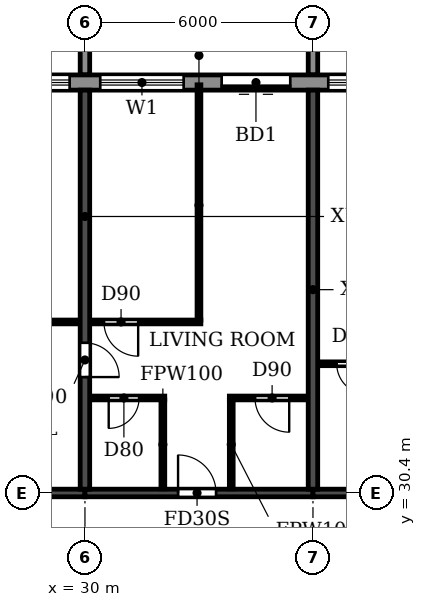
"""IFC4 building model, lengths in metres.
Left out: names, types, materials, properties, quantities, classifications, styles, units other than length and angle.
Written with IfcOpenShell. Run it as: python <this file> out.ifc"""

import sys

from ifc_helpers import new_model, si_unit, direction, frame, frame_2d, origin, place, context, subcontext, project, spatial, polyline, rectangle, outline, extrude, source, transform, mapped, element, fill, save


model = new_model("IFC4")
c1 = context("Model", 3, precision=1e-05, world=origin(), true_north=direction((0.0, 1.0)))
c2 = subcontext(c1, "Body", "Model", "MODEL_VIEW")
j1 = project(units=[si_unit("LENGTHUNIT", "METRE"), si_unit("PLANEANGLEUNIT", "RADIAN")], contexts=[c1])
p1 = place(None, origin())
s1 = spatial("IfcSite", under=j1, at=p1, CompositionType="ELEMENT")
p2 = place(p1, origin())
s2 = spatial("IfcBuilding", under=s1, at=p2, CompositionType="ELEMENT")
p3 = place(p2, frame((0.0, 0.0, 257.7)))
s3 = spatial("IfcBuildingStorey", under=s2, at=p3, CompositionType="ELEMENT", Elevation=257.7)
p4 = place(p3, frame((30.0, 30.5, 0.0), z_axis=(0.0, 0.0, 1.0), x_axis=(0.0, 1.0, 0.0)))
e1 = element("IfcWall", 1, at=p4, inside=s3, PredefinedType="SHEAR", context=c2, shape_type="SweptSolid", body=[
    extrude(rectangle(XDim=10.5, YDim=0.25, at=frame_2d((5.25, 0.0))), origin(), (0.0, 0.0, 1.0), 2.1),
])
p5 = place(p4, frame((2.95, 0.0, 0.0)))
e2 = element("IfcOpeningElement", 2, at=p5, cuts=e1, PredefinedType="OPENING", context=c2, shape_type="SweptSolid", body=[
    extrude(rectangle(XDim=0.9, YDim=2.1, at=frame_2d((0.45, 1.05))), frame((0.0, 0.135, 0.0), z_axis=(0.0, -1.0, 0.0), x_axis=(1.0, 0.0, 0.0)), (0.0, 0.0, 1.0), 0.27),
])
p6 = place(p3, frame((36.0, 30.5, 0.0), z_axis=(0.0, 0.0, 1.0), x_axis=(0.0, 1.0, 0.0)))
e3 = element("IfcWall", 3, at=p6, inside=s3, PredefinedType="SHEAR", context=c2, shape_type="SweptSolid", body=[
    extrude(rectangle(XDim=10.5, YDim=0.25, at=frame_2d((5.25, 0.0))), origin(), (0.0, 0.0, 1.0), 3.0),
])
p7 = place(p3, frame((24.0, 30.4, 0.0), z_axis=(0.0, 0.0, 1.0), x_axis=(1.0, 0.0, 0.0)))
e4 = element("IfcWall", 4, at=p7, inside=s3, PredefinedType="SHEAR", context=c2, shape_type="SweptSolid", body=[
    extrude(rectangle(XDim=6.0, YDim=0.2, at=frame_2d((3.0, 0.0))), origin(), (0.0, 0.0, 1.0), 2.4),
])
p8 = place(p3, frame((30.0, 30.4, 0.0), z_axis=(0.0, 0.0, 1.0), x_axis=(1.0, 0.0, 0.0)))
e5 = element("IfcWall", 5, at=p8, inside=s3, PredefinedType="SHEAR", context=c2, shape_type="SweptSolid", body=[
    extrude(rectangle(XDim=6.0, YDim=0.2, at=frame_2d((3.0, 0.0))), origin(), (0.0, 0.0, 1.0), 2.4),
])
p9 = place(p8, frame((2.45, 0.0, 0.0)))
e6 = element("IfcOpeningElement", 6, at=p9, cuts=e5, PredefinedType="OPENING", context=c2, shape_type="SweptSolid", body=[
    extrude(rectangle(XDim=1.0, YDim=2.1, at=frame_2d((0.5, 1.05))), frame((0.0, 0.11, 0.0), z_axis=(0.0, -1.0, 0.0), x_axis=(1.0, 0.0, 0.0)), (0.0, 0.0, 1.0), 0.22),
])
p10 = place(p3, frame((36.0, 30.4, 0.0), z_axis=(0.0, 0.0, 1.0), x_axis=(1.0, 0.0, 0.0)))
e7 = element("IfcWall", 7, at=p10, inside=s3, PredefinedType="SHEAR", context=c2, shape_type="SweptSolid", body=[
    extrude(rectangle(XDim=6.0, YDim=0.2, at=frame_2d((3.0, 0.0))), origin(), (0.0, 0.0, 1.0), 2.4),
])
p11 = place(p10, frame((2.45, 0.0, 0.0)))
e8 = element("IfcOpeningElement", 8, at=p11, cuts=e7, PredefinedType="OPENING", context=c2, shape_type="SweptSolid", body=[
    extrude(rectangle(XDim=1.0, YDim=2.1, at=frame_2d((0.5, 1.05))), frame((0.0, 0.11, 0.0), z_axis=(0.0, -1.0, 0.0), x_axis=(1.0, 0.0, 0.0)), (0.0, 0.0, 1.0), 0.22),
])
p12 = place(p3, frame((79.317, 41.2, 0.0), z_axis=(0.0, 0.0, 1.0), x_axis=(-1.0, 0.0, 0.0)))
e9 = element("IfcWall", 9, at=p12, inside=s3, PredefinedType="STANDARD", context=c2, shape_type="SweptSolid", body=[
    extrude(rectangle(XDim=56.634, YDim=0.4, at=frame_2d((28.317, 0.0))), origin(), (0.0, 0.0, 1.0), 3.0),
])
p13 = place(p12, frame((52.717, 0.0, 0.9)))
e10 = element("IfcOpeningElement", 10, at=p13, cuts=e9, PredefinedType="OPENING", context=c2, shape_type="SweptSolid", body=[
    extrude(rectangle(XDim=2.2, YDim=1.5, at=frame_2d((1.1, 0.75))), frame((0.0, 0.21, 0.0), z_axis=(0.0, -1.0, 0.0), x_axis=(1.0, 0.0, 0.0)), (0.0, 0.0, 1.0), 0.42),
])
p14 = place(p12, frame((49.717, 0.0, 0.9)))
e11 = element("IfcOpeningElement", 11, at=p14, cuts=e9, PredefinedType="OPENING", context=c2, shape_type="SweptSolid", body=[
    extrude(rectangle(XDim=2.2, YDim=1.5, at=frame_2d((1.1, 0.75))), frame((0.0, 0.21, 0.0), z_axis=(0.0, -1.0, 0.0), x_axis=(1.0, 0.0, 0.0)), (0.0, 0.0, 1.0), 0.42),
])
p15 = place(p12, frame((46.717, 0.0, 0.9)))
e12 = element("IfcOpeningElement", 12, at=p15, cuts=e9, PredefinedType="OPENING", context=c2, shape_type="SweptSolid", body=[
    extrude(rectangle(XDim=2.2, YDim=1.5, at=frame_2d((1.1, 0.75))), frame((0.0, 0.21, 0.0), z_axis=(0.0, -1.0, 0.0), x_axis=(1.0, 0.0, 0.0)), (0.0, 0.0, 1.0), 0.42),
])
p16 = place(p12, frame((43.917, 0.0, 0.0)))
e13 = element("IfcOpeningElement", 13, at=p16, cuts=e9, PredefinedType="OPENING", context=c2, shape_type="SweptSolid", body=[
    extrude(rectangle(XDim=1.8, YDim=2.4, at=frame_2d((0.9, 1.2))), frame((0.0, 0.21, 0.0), z_axis=(0.0, -1.0, 0.0), x_axis=(1.0, 0.0, 0.0)), (0.0, 0.0, 1.0), 0.42),
])
p17 = place(p12, frame((40.717, 0.0, 0.9)))
e14 = element("IfcOpeningElement", 14, at=p17, cuts=e9, PredefinedType="OPENING", context=c2, shape_type="SweptSolid", body=[
    extrude(rectangle(XDim=2.2, YDim=1.5, at=frame_2d((1.1, 0.75))), frame((0.0, 0.21, 0.0), z_axis=(0.0, -1.0, 0.0), x_axis=(1.0, 0.0, 0.0)), (0.0, 0.0, 1.0), 0.42),
])
p18 = place(p12, frame((37.917, 0.0, 0.0)))
e15 = element("IfcOpeningElement", 15, at=p18, cuts=e9, PredefinedType="OPENING", context=c2, shape_type="SweptSolid", body=[
    extrude(rectangle(XDim=1.8, YDim=2.4, at=frame_2d((0.9, 1.2))), frame((0.0, 0.21, 0.0), z_axis=(0.0, -1.0, 0.0), x_axis=(1.0, 0.0, 0.0)), (0.0, 0.0, 1.0), 0.42),
])
p19 = place(p12, frame((34.717, 0.0, 0.9)))
e16 = element("IfcOpeningElement", 16, at=p19, cuts=e9, PredefinedType="OPENING", context=c2, shape_type="SweptSolid", body=[
    extrude(rectangle(XDim=2.2, YDim=1.5, at=frame_2d((1.1, 0.75))), frame((0.0, 0.21, 0.0), z_axis=(0.0, -1.0, 0.0), x_axis=(1.0, 0.0, 0.0)), (0.0, 0.0, 1.0), 0.42),
])
p20 = place(p12, frame((31.717, 0.0, 0.9)))
e17 = element("IfcOpeningElement", 17, at=p20, cuts=e9, PredefinedType="OPENING", context=c2, shape_type="SweptSolid", body=[
    extrude(rectangle(XDim=2.2, YDim=1.5, at=frame_2d((1.1, 0.75))), frame((0.0, 0.21, 0.0), z_axis=(0.0, -1.0, 0.0), x_axis=(1.0, 0.0, 0.0)), (0.0, 0.0, 1.0), 0.42),
])
p21 = place(p12, frame((28.717, 0.0, 0.9)))
e18 = element("IfcOpeningElement", 18, at=p21, cuts=e9, PredefinedType="OPENING", context=c2, shape_type="SweptSolid", body=[
    extrude(rectangle(XDim=2.2, YDim=1.5, at=frame_2d((1.1, 0.75))), frame((0.0, 0.21, 0.0), z_axis=(0.0, -1.0, 0.0), x_axis=(1.0, 0.0, 0.0)), (0.0, 0.0, 1.0), 0.42),
])
p22 = place(p12, frame((25.917, 0.0, 0.0)))
e19 = element("IfcOpeningElement", 19, at=p22, cuts=e9, PredefinedType="OPENING", context=c2, shape_type="SweptSolid", body=[
    extrude(rectangle(XDim=1.8, YDim=2.4, at=frame_2d((0.9, 1.2))), frame((0.0, 0.21, 0.0), z_axis=(0.0, -1.0, 0.0), x_axis=(1.0, 0.0, 0.0)), (0.0, 0.0, 1.0), 0.42),
])
p23 = place(p12, frame((22.917, 0.0, 0.0)))
e20 = element("IfcOpeningElement", 20, at=p23, cuts=e9, PredefinedType="OPENING", context=c2, shape_type="SweptSolid", body=[
    extrude(rectangle(XDim=1.8, YDim=2.4, at=frame_2d((0.9, 1.2))), frame((0.0, 0.21, 0.0), z_axis=(0.0, -1.0, 0.0), x_axis=(1.0, 0.0, 0.0)), (0.0, 0.0, 1.0), 0.42),
])
p24 = place(p12, frame((19.717, 0.0, 0.9)))
e21 = element("IfcOpeningElement", 21, at=p24, cuts=e9, PredefinedType="OPENING", context=c2, shape_type="SweptSolid", body=[
    extrude(rectangle(XDim=2.2, YDim=1.5, at=frame_2d((1.1, 0.75))), frame((0.0, 0.21, 0.0), z_axis=(0.0, -1.0, 0.0), x_axis=(1.0, 0.0, 0.0)), (0.0, 0.0, 1.0), 0.42),
])
p25 = place(p12, frame((16.717, 0.0, 0.9)))
e22 = element("IfcOpeningElement", 22, at=p25, cuts=e9, PredefinedType="OPENING", context=c2, shape_type="SweptSolid", body=[
    extrude(rectangle(XDim=2.2, YDim=1.5, at=frame_2d((1.1, 0.75))), frame((0.0, 0.21, 0.0), z_axis=(0.0, -1.0, 0.0), x_axis=(1.0, 0.0, 0.0)), (0.0, 0.0, 1.0), 0.42),
])
p26 = place(p12, frame((13.717, 0.0, 0.9)))
e23 = element("IfcOpeningElement", 23, at=p26, cuts=e9, PredefinedType="OPENING", context=c2, shape_type="SweptSolid", body=[
    extrude(rectangle(XDim=2.2, YDim=1.5, at=frame_2d((1.1, 0.75))), frame((0.0, 0.21, 0.0), z_axis=(0.0, -1.0, 0.0), x_axis=(1.0, 0.0, 0.0)), (0.0, 0.0, 1.0), 0.42),
])
p27 = place(p12, frame((10.717, 0.0, 0.9)))
e24 = element("IfcOpeningElement", 24, at=p27, cuts=e9, PredefinedType="OPENING", context=c2, shape_type="SweptSolid", body=[
    extrude(rectangle(XDim=2.2, YDim=1.5, at=frame_2d((1.1, 0.75))), frame((0.0, 0.21, 0.0), z_axis=(0.0, -1.0, 0.0), x_axis=(1.0, 0.0, 0.0)), (0.0, 0.0, 1.0), 0.42),
])
p28 = place(p12, frame((7.917, 0.0, 0.0)))
e25 = element("IfcOpeningElement", 25, at=p28, cuts=e9, PredefinedType="OPENING", context=c2, shape_type="SweptSolid", body=[
    extrude(rectangle(XDim=1.8, YDim=2.4, at=frame_2d((0.9, 1.2))), frame((0.0, 0.21, 0.0), z_axis=(0.0, -1.0, 0.0), x_axis=(1.0, 0.0, 0.0)), (0.0, 0.0, 1.0), 0.42),
])
p29 = place(p12, frame((4.717, 0.0, 0.9)))
e26 = element("IfcOpeningElement", 26, at=p29, cuts=e9, PredefinedType="OPENING", context=c2, shape_type="SweptSolid", body=[
    extrude(rectangle(XDim=2.2, YDim=1.5, at=frame_2d((1.1, 0.75))), frame((0.0, 0.21, 0.0), z_axis=(0.0, -1.0, 0.0), x_axis=(1.0, 0.0, 0.0)), (0.0, 0.0, 1.0), 0.42),
])
p30 = place(p12, frame((1.917, 0.0, 0.0)))
e27 = element("IfcOpeningElement", 27, at=p30, cuts=e9, PredefinedType="OPENING", context=c2, shape_type="SweptSolid", body=[
    extrude(rectangle(XDim=1.8, YDim=2.4, at=frame_2d((0.9, 1.2))), frame((0.0, 0.21, 0.0), z_axis=(0.0, -1.0, 0.0), x_axis=(1.0, 0.0, 0.0)), (0.0, 0.0, 1.0), 0.42),
])
m1 = source(origin(), c2, "Body", "SweptSolid", [
    extrude(outline(polyline([(0.0, 0.0), (0.25, 0.0), (0.25, 3.1), (0.0, 3.1), (0.0, 0.0)])), origin(), (0.0, 0.0, 1.0), 2.1),
])
p31 = place(p3, frame((29.875, 41.4, 0.0)))
e28 = element("IfcWall", 28, at=p31, inside=s3, PredefinedType="STANDARD", context=c2, shape_type="MappedRepresentation", body=[
    mapped(m1, transform((0.0, 0.0, 0.0))),
])
m2 = source(origin(), c2, "Body", "SweptSolid", [
    extrude(outline(polyline([(0.0, 0.0), (0.25, 0.0), (0.25, 3.1), (0.0, 3.1), (0.0, 0.0)])), origin(), (0.0, 0.0, 1.0), 3.1),
])
p32 = place(p3, frame((35.875, 41.4, 0.0)))
e29 = element("IfcWall", 29, at=p32, inside=s3, PredefinedType="STANDARD", context=c2, shape_type="MappedRepresentation", body=[
    mapped(m2, transform((0.0, 0.0, 0.0))),
])
p33 = place(p3, frame((30.135, 32.9, 0.0), z_axis=(0.0, 0.0, 1.0), x_axis=(1.0, 0.0, 0.0)))
e30 = element("IfcWall", 30, at=p33, inside=s3, PredefinedType="PARTITIONING", context=c2, shape_type="SweptSolid", body=[
    extrude(rectangle(XDim=1.965, YDim=0.1, at=frame_2d((0.982, 0.0))), origin(), (0.0, 0.0, 1.0), 3.0),
])
p34 = place(p33, frame((0.49, 0.0, 0.0)))
e31 = element("IfcOpeningElement", 31, at=p34, cuts=e30, PredefinedType="OPENING", context=c2, shape_type="SweptSolid", body=[
    extrude(rectangle(XDim=0.8, YDim=2.1, at=frame_2d((0.4, 1.05))), frame((0.0, 0.06, 0.0), z_axis=(0.0, -1.0, 0.0), x_axis=(1.0, 0.0, 0.0)), (0.0, 0.0, 1.0), 0.12),
])
p35 = place(p3, frame((33.8, 32.9, 0.0), z_axis=(0.0, 0.0, 1.0), x_axis=(1.0, 0.0, 0.0)))
e32 = element("IfcWall", 32, at=p35, inside=s3, PredefinedType="PARTITIONING", context=c2, shape_type="SweptSolid", body=[
    extrude(rectangle(XDim=2.065, YDim=0.1, at=frame_2d((1.032, 0.0))), origin(), (0.0, 0.0, 1.0), 3.0),
])
p36 = place(p35, frame((0.675, 0.0, 0.0)))
e33 = element("IfcOpeningElement", 33, at=p36, cuts=e32, PredefinedType="OPENING", context=c2, shape_type="SweptSolid", body=[
    extrude(rectangle(XDim=0.9, YDim=2.1, at=frame_2d((0.45, 1.05))), frame((0.0, 0.06, 0.0), z_axis=(0.0, -1.0, 0.0), x_axis=(1.0, 0.0, 0.0)), (0.0, 0.0, 1.0), 0.12),
])
p37 = place(p3, frame((36.135, 33.8, 0.0), z_axis=(0.0, 0.0, 1.0), x_axis=(1.0, 0.0, 0.0)))
e34 = element("IfcWall", 34, at=p37, inside=s3, PredefinedType="PARTITIONING", context=c2, shape_type="SweptSolid", body=[
    extrude(rectangle(XDim=1.965, YDim=0.1, at=frame_2d((0.982, 0.0))), origin(), (0.0, 0.0, 1.0), 3.0),
])
p38 = place(p37, frame((0.49, 0.0, 0.0)))
e35 = element("IfcOpeningElement", 35, at=p38, cuts=e34, PredefinedType="OPENING", context=c2, shape_type="SweptSolid", body=[
    extrude(rectangle(XDim=0.8, YDim=2.1, at=frame_2d((0.4, 1.05))), frame((0.0, 0.06, 0.0), z_axis=(0.0, -1.0, 0.0), x_axis=(1.0, 0.0, 0.0)), (0.0, 0.0, 1.0), 0.12),
])
p39 = place(p3, frame((24.135, 34.9, 0.0), z_axis=(0.0, 0.0, 1.0), x_axis=(1.0, 0.0, 0.0)))
e36 = element("IfcWall", 36, at=p39, inside=s3, PredefinedType="PARTITIONING", context=c2, shape_type="SweptSolid", body=[
    extrude(rectangle(XDim=5.73, YDim=0.1, at=frame_2d((2.865, 0.0))), origin(), (0.0, 0.0, 1.0), 3.0),
])
p40 = place(p39, frame((1.465, 0.0, 0.0)))
e37 = element("IfcOpeningElement", 37, at=p40, cuts=e36, PredefinedType="OPENING", context=c2, shape_type="SweptSolid", body=[
    extrude(rectangle(XDim=0.9, YDim=2.1, at=frame_2d((0.45, 1.05))), frame((0.0, 0.06, 0.0), z_axis=(0.0, -1.0, 0.0), x_axis=(1.0, 0.0, 0.0)), (0.0, 0.0, 1.0), 0.12),
])
p41 = place(p39, frame((3.365, 0.0, 0.0)))
e38 = element("IfcOpeningElement", 38, at=p41, cuts=e36, PredefinedType="OPENING", context=c2, shape_type="SweptSolid", body=[
    extrude(rectangle(XDim=0.9, YDim=2.1, at=frame_2d((0.45, 1.05))), frame((0.0, 0.06, 0.0), z_axis=(0.0, -1.0, 0.0), x_axis=(1.0, 0.0, 0.0)), (0.0, 0.0, 1.0), 0.12),
])
p42 = place(p3, frame((30.135, 34.9, 0.0), z_axis=(0.0, 0.0, 1.0), x_axis=(1.0, 0.0, 0.0)))
e39 = element("IfcWall", 39, at=p42, inside=s3, PredefinedType="PARTITIONING", context=c2, shape_type="SweptSolid", body=[
    extrude(rectangle(XDim=2.915, YDim=0.1, at=frame_2d((1.458, 0.0))), origin(), (0.0, 0.0, 1.0), 3.0),
])
p43 = place(p42, frame((0.365, 0.0, 0.0)))
e40 = element("IfcOpeningElement", 40, at=p43, cuts=e39, PredefinedType="OPENING", context=c2, shape_type="SweptSolid", body=[
    extrude(rectangle(XDim=0.9, YDim=2.1, at=frame_2d((0.45, 1.05))), frame((0.0, 0.06, 0.0), z_axis=(0.0, -1.0, 0.0), x_axis=(1.0, 0.0, 0.0)), (0.0, 0.0, 1.0), 0.12),
])
p44 = place(p3, frame((32.05, 30.51, 0.0), z_axis=(0.0, 0.0, 1.0), x_axis=(0.0, 1.0, 0.0)))
e41 = element("IfcWall", 41, at=p44, inside=s3, PredefinedType="PARTITIONING", context=c2, shape_type="SweptSolid", body=[
    extrude(rectangle(XDim=2.34, YDim=0.1, at=frame_2d((1.17, 0.0))), origin(), (0.0, 0.0, 1.0), 3.0),
])
p45 = place(p3, frame((33.0, 34.95, 0.0), z_axis=(0.0, 0.0, 1.0), x_axis=(0.0, 1.0, 0.0)))
e42 = element("IfcWall", 42, at=p45, inside=s3, PredefinedType="PARTITIONING", context=c2, shape_type="SweptSolid", body=[
    extrude(rectangle(XDim=6.19, YDim=0.1, at=frame_2d((3.095, 0.0))), origin(), (0.0, 0.0, 1.0), 3.0),
])
p46 = place(p3, frame((33.85, 30.51, 0.0), z_axis=(0.0, 0.0, 1.0), x_axis=(0.0, 1.0, 0.0)))
e43 = element("IfcWall", 43, at=p46, inside=s3, PredefinedType="PARTITIONING", context=c2, shape_type="SweptSolid", body=[
    extrude(rectangle(XDim=2.34, YDim=0.1, at=frame_2d((1.17, 0.0))), origin(), (0.0, 0.0, 1.0), 3.0),
])
p47 = place(p14, origin())
e44 = element("IfcWindow", 44, at=p47, inside=s3, PartitioningType="DOUBLE_PANEL_HORIZONTAL", PredefinedType="WINDOW", context=c2, shape_type="SweptSolid", body=[
    extrude(rectangle(XDim=2.2, YDim=1.5, at=frame_2d((1.1, 0.75))), frame((0.0, 0.03, 0.0), z_axis=(0.0, -1.0, 0.0), x_axis=(1.0, 0.0, 0.0)), (0.0, 0.0, 1.0), 0.06),
])
fill(e11, e44)
p48 = place(p15, origin())
e45 = element("IfcWindow", 45, at=p48, inside=s3, PartitioningType="DOUBLE_PANEL_HORIZONTAL", PredefinedType="WINDOW", context=c2, shape_type="SweptSolid", body=[
    extrude(rectangle(XDim=2.2, YDim=1.5, at=frame_2d((1.1, 0.75))), frame((0.0, 0.03, 0.0), z_axis=(0.0, -1.0, 0.0), x_axis=(1.0, 0.0, 0.0)), (0.0, 0.0, 1.0), 0.06),
])
fill(e12, e45)
p49 = place(p16, origin())
e46 = element("IfcDoor", 46, at=p49, inside=s3, OperationType="DOUBLE_DOOR_SLIDING", PredefinedType="DOOR", context=c2, shape_type="SweptSolid", body=[
    extrude(rectangle(XDim=1.8, YDim=2.4, at=frame_2d((0.9, 1.2))), frame((0.0, 0.025, 0.0), z_axis=(0.0, -1.0, 0.0), x_axis=(1.0, 0.0, 0.0)), (0.0, 0.0, 1.0), 0.05),
])
fill(e13, e46)
p50 = place(p17, origin())
e47 = element("IfcWindow", 47, at=p50, inside=s3, PartitioningType="DOUBLE_PANEL_HORIZONTAL", PredefinedType="WINDOW", context=c2, shape_type="SweptSolid", body=[
    extrude(rectangle(XDim=2.2, YDim=1.5, at=frame_2d((1.1, 0.75))), frame((0.0, 0.03, 0.0), z_axis=(0.0, -1.0, 0.0), x_axis=(1.0, 0.0, 0.0)), (0.0, 0.0, 1.0), 0.06),
])
fill(e14, e47)
p51 = place(p5, frame((0.9, 0.0, 0.0), z_axis=(0.0, 0.0, 1.0), x_axis=(-1.0, 0.0, 0.0)))
e48 = element("IfcDoor", 48, at=p51, inside=s3, OperationType="SINGLE_SWING_RIGHT", PredefinedType="DOOR", context=c2, shape_type="SweptSolid", body=[
    extrude(rectangle(XDim=0.9, YDim=2.1, at=frame_2d((0.45, 1.05))), frame((0.0, 0.025, 0.0), z_axis=(0.0, -1.0, 0.0), x_axis=(1.0, 0.0, 0.0)), (0.0, 0.0, 1.0), 0.05),
])
fill(e2, e48)
p52 = place(p43, frame((0.9, 0.0, 0.0), z_axis=(0.0, 0.0, 1.0), x_axis=(-1.0, 0.0, 0.0)))
e49 = element("IfcDoor", 49, at=p52, inside=s3, OperationType="SINGLE_SWING_LEFT", PredefinedType="DOOR", context=c2, shape_type="SweptSolid", body=[
    extrude(rectangle(XDim=0.9, YDim=2.1, at=frame_2d((0.45, 1.05))), frame((0.0, 0.025, 0.0), z_axis=(0.0, -1.0, 0.0), x_axis=(1.0, 0.0, 0.0)), (0.0, 0.0, 1.0), 0.05),
])
fill(e40, e49)
p53 = place(p34, frame((0.8, 0.0, 0.0), z_axis=(0.0, 0.0, 1.0), x_axis=(-1.0, 0.0, 0.0)))
e50 = element("IfcDoor", 50, at=p53, inside=s3, OperationType="SINGLE_SWING_RIGHT", PredefinedType="DOOR", context=c2, shape_type="SweptSolid", body=[
    extrude(rectangle(XDim=0.8, YDim=2.1, at=frame_2d((0.4, 1.05))), frame((0.0, 0.025, 0.0), z_axis=(0.0, -1.0, 0.0), x_axis=(1.0, 0.0, 0.0)), (0.0, 0.0, 1.0), 0.05),
])
fill(e31, e50)
p54 = place(p9, origin())
e51 = element("IfcDoor", 51, at=p54, inside=s3, OperationType="SINGLE_SWING_LEFT", PredefinedType="DOOR", context=c2, shape_type="SweptSolid", body=[
    extrude(rectangle(XDim=1.0, YDim=2.1, at=frame_2d((0.5, 1.05))), frame((0.0, 0.025, 0.0), z_axis=(0.0, -1.0, 0.0), x_axis=(1.0, 0.0, 0.0)), (0.0, 0.0, 1.0), 0.05),
])
fill(e6, e51)
p55 = place(p36, frame((0.9, 0.0, 0.0), z_axis=(0.0, 0.0, 1.0), x_axis=(-1.0, 0.0, 0.0)))
e52 = element("IfcDoor", 52, at=p55, inside=s3, OperationType="SINGLE_SWING_LEFT", PredefinedType="DOOR", context=c2, shape_type="SweptSolid", body=[
    extrude(rectangle(XDim=0.9, YDim=2.1, at=frame_2d((0.45, 1.05))), frame((0.0, 0.025, 0.0), z_axis=(0.0, -1.0, 0.0), x_axis=(1.0, 0.0, 0.0)), (0.0, 0.0, 1.0), 0.05),
])
fill(e33, e52)
p56 = place(p38, frame((0.8, 0.0, 0.0), z_axis=(0.0, 0.0, 1.0), x_axis=(-1.0, 0.0, 0.0)))
e53 = element("IfcDoor", 53, at=p56, inside=s3, OperationType="SINGLE_SWING_LEFT", PredefinedType="DOOR", context=c2, shape_type="SweptSolid", body=[
    extrude(rectangle(XDim=0.8, YDim=2.1, at=frame_2d((0.4, 1.05))), frame((0.0, 0.025, 0.0), z_axis=(0.0, -1.0, 0.0), x_axis=(1.0, 0.0, 0.0)), (0.0, 0.0, 1.0), 0.05),
])
fill(e35, e53)
save(model, sys.argv[1])
